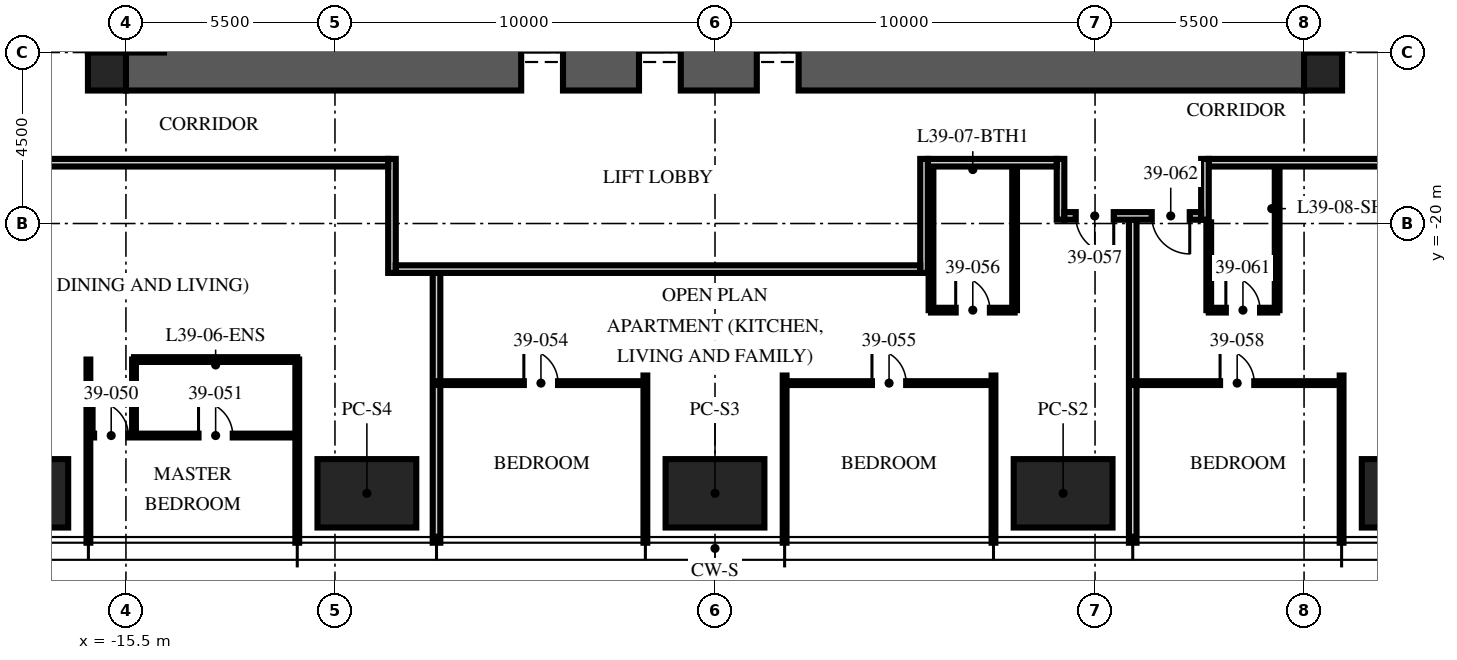
"""IFC4 building model, lengths in metres.
Left out: names, types, materials, properties, quantities, classifications, styles, units other than length and angle.
Written with IfcOpenShell. Run it as: python <this file> out.ifc"""

import sys

from ifc_helpers import new_model, si_unit, direction, frame, frame_2d, origin, origin_2d, place, context, subcontext, project, spatial, rectangle, extrude, element, fill, save


model = new_model("IFC4")
c1 = context("Model", 3, precision=1e-05, world=origin(), true_north=direction((0.0, 1.0)))
c2 = subcontext(c1, "Body", "Model", "MODEL_VIEW")
j1 = project(units=[si_unit("LENGTHUNIT", "METRE"), si_unit("PLANEANGLEUNIT", "RADIAN")], contexts=[c1])
p1 = place(None, origin())
s1 = spatial("IfcSite", under=j1, at=p1, CompositionType="ELEMENT")
p2 = place(p1, origin())
s2 = spatial("IfcBuilding", under=s1, at=p2, CompositionType="ELEMENT")
p3 = place(p2, frame((0.0, 0.0, 156.0)))
s3 = spatial("IfcBuildingStorey", under=s2, at=p3, CompositionType="ELEMENT", Elevation=156.0)
p4 = place(p3, frame((-15.5, -15.5, -0.25), z_axis=(0.0, 0.0, 1.0), x_axis=(1.0, 0.0, 0.0)))
e1 = element("IfcWall", 1, at=p4, inside=s3, PredefinedType="SHEAR", context=c2, shape_type="SweptSolid", body=[
    extrude(rectangle(XDim=31.0, YDim=2.0, at=frame_2d((15.5, 0.0))), origin(), (0.0, 0.0, 1.0), 3.75),
])
p5 = place(p4, frame((10.4, 0.0, 0.25)))
e2 = element("IfcOpeningElement", 2, at=p5, cuts=e1, PredefinedType="OPENING", context=c2, shape_type="SweptSolid", body=[
    extrude(rectangle(XDim=1.1, YDim=2.1, at=frame_2d((0.55, 1.05))), frame((0.0, 1.01, 0.0), z_axis=(0.0, -1.0, 0.0), x_axis=(1.0, 0.0, 0.0)), (0.0, 0.0, 1.0), 2.02),
])
p6 = place(p4, frame((13.5, 0.0, 0.25)))
e3 = element("IfcOpeningElement", 3, at=p6, cuts=e1, PredefinedType="OPENING", context=c2, shape_type="SweptSolid", body=[
    extrude(rectangle(XDim=1.1, YDim=2.1, at=frame_2d((0.55, 1.05))), frame((0.0, 1.01, 0.0), z_axis=(0.0, -1.0, 0.0), x_axis=(1.0, 0.0, 0.0)), (0.0, 0.0, 1.0), 2.02),
])
p7 = place(p4, frame((16.6, 0.0, 0.25)))
e4 = element("IfcOpeningElement", 4, at=p7, cuts=e1, PredefinedType="OPENING", context=c2, shape_type="SweptSolid", body=[
    extrude(rectangle(XDim=1.1, YDim=2.1, at=frame_2d((0.55, 1.05))), frame((0.0, 1.01, 0.0), z_axis=(0.0, -1.0, 0.0), x_axis=(1.0, 0.0, 0.0)), (0.0, 0.0, 1.0), 2.02),
])
for number, where, z_axis, x_axis in (
    (5, (-16.0, -16.0, -0.25), (0.0, 0.0, 1.0), (1.0, 0.0, 0.0)),
    (6, (16.0, -16.0, -0.25), (0.0, 0.0, 1.0), (1.0, 0.0, 0.0)),
):
    element("IfcColumn", number, at=place(p3, frame(where, z_axis=z_axis, x_axis=x_axis)), inside=s3, PredefinedType="COLUMN", context=c2, shape_type="SweptSolid", body=[
        extrude(rectangle(XDim=1.0, YDim=1.0, at=origin_2d()), origin(), (0.0, 0.0, 1.0), 3.75),
    ])
for number, where, z_axis, x_axis in (
    (7, (18.32, -27.1, 0.0), (0.0, 0.0, 1.0), (1.0, 0.0, 0.0)),
    (8, (9.16, -27.1, 0.0), (0.0, 0.0, 1.0), (1.0, 0.0, 0.0)),
    (9, (0.0, -27.1, 0.0), (0.0, 0.0, 1.0), (1.0, 0.0, 0.0)),
    (10, (-9.16, -27.1, 0.0), (0.0, 0.0, 1.0), (1.0, 0.0, 0.0)),
    (11, (-18.32, -27.1, 0.0), (0.0, 0.0, 1.0), (1.0, 0.0, 0.0)),
):
    element("IfcColumn", number, at=place(p3, frame(where, z_axis=z_axis, x_axis=x_axis)), inside=s3, PredefinedType="COLUMN", context=c2, shape_type="SweptSolid", body=[
        extrude(rectangle(XDim=2.6, YDim=1.8, at=origin_2d()), origin(), (0.0, 0.0, 1.0), 3.75),
    ])
for number, where, z_axis, x_axis in (
    (12, (-16.488, -23.58, 0.0), (0.0, 0.0, 1.0), (0.0, -1.0, 0.0)),
    (13, (-10.992, -23.58, 0.0), (0.0, 0.0, 1.0), (0.0, -1.0, 0.0)),
):
    element("IfcWall", number, at=place(p3, frame(where, z_axis=z_axis, x_axis=x_axis)), inside=s3, PredefinedType="PARTITIONING", context=c2, shape_type="SweptSolid", body=[
        extrude(rectangle(XDim=4.82, YDim=0.1, at=frame_2d((2.41, 0.0))), origin(), (0.0, 0.0, 1.0), 2.81),
    ])
p8 = place(p3, frame((-7.328, -21.3, 0.0), z_axis=(0.0, 0.0, 1.0), x_axis=(0.0, -1.0, 0.0)))
e14 = element("IfcWall", 14, at=p8, inside=s3, PredefinedType="PARTITIONING", context=c2, shape_type="SweptSolid", body=[
    extrude(rectangle(XDim=7.1, YDim=0.2, at=frame_2d((3.55, 0.0))), origin(), (0.0, 0.0, 1.0), 2.81),
])
for number, where, z_axis, x_axis in (
    (15, (-1.832, -24.0, 0.0), (0.0, 0.0, 1.0), (0.0, -1.0, 0.0)),
    (16, (1.832, -24.0, 0.0), (0.0, 0.0, 1.0), (0.0, -1.0, 0.0)),
    (17, (7.328, -24.0, 0.0), (0.0, 0.0, 1.0), (0.0, -1.0, 0.0)),
):
    element("IfcWall", number, at=place(p3, frame(where, z_axis=z_axis, x_axis=x_axis)), inside=s3, PredefinedType="PARTITIONING", context=c2, shape_type="SweptSolid", body=[
        extrude(rectangle(XDim=4.4, YDim=0.1, at=frame_2d((2.2, 0.0))), origin(), (0.0, 0.0, 1.0), 2.81),
    ])
p9 = place(p3, frame((10.992, -19.9, 0.0), z_axis=(0.0, 0.0, 1.0), x_axis=(0.0, -1.0, 0.0)))
e18 = element("IfcWall", 18, at=p9, inside=s3, PredefinedType="PARTITIONING", context=c2, shape_type="SweptSolid", body=[
    extrude(rectangle(XDim=8.5, YDim=0.2, at=frame_2d((4.25, 0.0))), origin(), (0.0, 0.0, 1.0), 2.81),
])
p10 = place(p3, frame((16.488, -24.0, 0.0), z_axis=(0.0, 0.0, 1.0), x_axis=(0.0, -1.0, 0.0)))
e19 = element("IfcWall", 19, at=p10, inside=s3, PredefinedType="PARTITIONING", context=c2, shape_type="SweptSolid", body=[
    extrude(rectangle(XDim=4.4, YDim=0.1, at=frame_2d((2.2, 0.0))), origin(), (0.0, 0.0, 1.0), 2.81),
])
p11 = place(p3, frame((-16.488, -25.58, 0.0), z_axis=(0.0, 0.0, 1.0), x_axis=(1.0, 0.0, 0.0)))
e20 = element("IfcWall", 20, at=p11, inside=s3, PredefinedType="PARTITIONING", context=c2, shape_type="SweptSolid", body=[
    extrude(rectangle(XDim=5.496, YDim=0.1, at=frame_2d((2.748, 0.0))), origin(), (0.0, 0.0, 1.0), 2.81),
])
p12 = place(p11, frame((0.15, 0.0, 0.0)))
e21 = element("IfcOpeningElement", 21, at=p12, cuts=e20, PredefinedType="OPENING", context=c2, shape_type="SweptSolid", body=[
    extrude(rectangle(XDim=0.9, YDim=2.1, at=frame_2d((0.45, 1.05))), frame((0.0, 0.06, 0.0), z_axis=(0.0, -1.0, 0.0), x_axis=(1.0, 0.0, 0.0)), (0.0, 0.0, 1.0), 0.12),
])
p13 = place(p11, frame((2.898, 0.0, 0.0)))
e22 = element("IfcOpeningElement", 22, at=p13, cuts=e20, PredefinedType="OPENING", context=c2, shape_type="SweptSolid", body=[
    extrude(rectangle(XDim=0.9, YDim=2.1, at=frame_2d((0.45, 1.05))), frame((0.0, 0.06, 0.0), z_axis=(0.0, -1.0, 0.0), x_axis=(1.0, 0.0, 0.0)), (0.0, 0.0, 1.0), 0.12),
])
p14 = place(p3, frame((-15.288, -23.58, 0.0), z_axis=(0.0, 0.0, 1.0), x_axis=(0.0, -1.0, 0.0)))
e23 = element("IfcWall", 23, at=p14, inside=s3, PredefinedType="PARTITIONING", context=c2, shape_type="SweptSolid", body=[
    extrude(rectangle(XDim=2.0, YDim=0.1, at=frame_2d((1.0, 0.0))), origin(), (0.0, 0.0, 1.0), 3.5),
])
p15 = place(p3, frame((-15.288, -23.58, 0.0), z_axis=(0.0, 0.0, 1.0), x_axis=(1.0, 0.0, 0.0)))
e24 = element("IfcWall", 24, at=p15, inside=s3, PredefinedType="PARTITIONING", context=c2, shape_type="SweptSolid", body=[
    extrude(rectangle(XDim=4.296, YDim=0.125, at=frame_2d((2.148, 0.0))), origin(), (0.0, 0.0, 1.0), 2.81),
])
p16 = place(p3, frame((-7.328, -24.2, 0.0), z_axis=(0.0, 0.0, 1.0), x_axis=(1.0, 0.0, 0.0)))
e25 = element("IfcWall", 25, at=p16, inside=s3, PredefinedType="PARTITIONING", context=c2, shape_type="SweptSolid", body=[
    extrude(rectangle(XDim=5.496, YDim=0.1, at=frame_2d((2.748, 0.0))), origin(), (0.0, 0.0, 1.0), 2.81),
])
p17 = place(p16, frame((2.298, 0.0, 0.0)))
e26 = element("IfcOpeningElement", 26, at=p17, cuts=e25, PredefinedType="OPENING", context=c2, shape_type="SweptSolid", body=[
    extrude(rectangle(XDim=0.9, YDim=2.1, at=frame_2d((0.45, 1.05))), frame((0.0, 0.06, 0.0), z_axis=(0.0, -1.0, 0.0), x_axis=(1.0, 0.0, 0.0)), (0.0, 0.0, 1.0), 0.12),
])
p18 = place(p3, frame((1.832, -24.2, 0.0), z_axis=(0.0, 0.0, 1.0), x_axis=(1.0, 0.0, 0.0)))
e27 = element("IfcWall", 27, at=p18, inside=s3, PredefinedType="PARTITIONING", context=c2, shape_type="SweptSolid", body=[
    extrude(rectangle(XDim=5.496, YDim=0.1, at=frame_2d((2.748, 0.0))), origin(), (0.0, 0.0, 1.0), 2.81),
])
p19 = place(p18, frame((2.298, 0.0, 0.0)))
e28 = element("IfcOpeningElement", 28, at=p19, cuts=e27, PredefinedType="OPENING", context=c2, shape_type="SweptSolid", body=[
    extrude(rectangle(XDim=0.9, YDim=2.1, at=frame_2d((0.45, 1.05))), frame((0.0, 0.06, 0.0), z_axis=(0.0, -1.0, 0.0), x_axis=(1.0, 0.0, 0.0)), (0.0, 0.0, 1.0), 0.12),
])
p20 = place(p3, frame((5.684, -22.28, 0.0), z_axis=(0.0, 0.0, 1.0), x_axis=(1.0, 0.0, 0.0)))
e29 = element("IfcWall", 29, at=p20, inside=s3, PredefinedType="PARTITIONING", context=c2, shape_type="SweptSolid", body=[
    extrude(rectangle(XDim=2.2, YDim=0.125, at=frame_2d((1.1, 0.0))), origin(), (0.0, 0.0, 1.0), 3.5),
])
p21 = place(p20, frame((0.65, 0.0, 0.0)))
e30 = element("IfcOpeningElement", 30, at=p21, cuts=e29, PredefinedType="OPENING", context=c2, shape_type="SweptSolid", body=[
    extrude(rectangle(XDim=0.9, YDim=2.1, at=frame_2d((0.45, 1.05))), frame((0.0, 0.073, 0.0), z_axis=(0.0, -1.0, 0.0), x_axis=(1.0, 0.0, 0.0)), (0.0, 0.0, 1.0), 0.145),
])
for number, where, z_axis, x_axis in (
    (31, (5.684, -18.5, 0.0), (0.0, 0.0, 1.0), (0.0, -1.0, 0.0)),
    (32, (7.884, -18.5, 0.0), (0.0, 0.0, 1.0), (0.0, -1.0, 0.0)),
):
    element("IfcWall", number, at=place(p3, frame(where, z_axis=z_axis, x_axis=x_axis)), inside=s3, PredefinedType="PARTITIONING", context=c2, shape_type="SweptSolid", body=[
        extrude(rectangle(XDim=3.78, YDim=0.125, at=frame_2d((1.89, 0.0))), origin(), (0.0, 0.0, 1.0), 3.5),
    ])
p22 = place(p3, frame((10.992, -24.2, 0.0), z_axis=(0.0, 0.0, 1.0), x_axis=(1.0, 0.0, 0.0)))
e33 = element("IfcWall", 33, at=p22, inside=s3, PredefinedType="PARTITIONING", context=c2, shape_type="SweptSolid", body=[
    extrude(rectangle(XDim=5.496, YDim=0.1, at=frame_2d((2.748, 0.0))), origin(), (0.0, 0.0, 1.0), 2.81),
])
p23 = place(p22, frame((2.298, 0.0, 0.0)))
e34 = element("IfcOpeningElement", 34, at=p23, cuts=e33, PredefinedType="OPENING", context=c2, shape_type="SweptSolid", body=[
    extrude(rectangle(XDim=0.9, YDim=2.1, at=frame_2d((0.45, 1.05))), frame((0.0, 0.06, 0.0), z_axis=(0.0, -1.0, 0.0), x_axis=(1.0, 0.0, 0.0)), (0.0, 0.0, 1.0), 0.12),
])
p24 = place(p3, frame((12.992, -22.28, 0.0), z_axis=(0.0, 0.0, 1.0), x_axis=(1.0, 0.0, 0.0)))
e35 = element("IfcWall", 35, at=p24, inside=s3, PredefinedType="PARTITIONING", context=c2, shape_type="SweptSolid", body=[
    extrude(rectangle(XDim=1.8, YDim=0.125, at=frame_2d((0.9, 0.0))), origin(), (0.0, 0.0, 1.0), 2.81),
])
p25 = place(p24, frame((0.45, 0.0, 0.0)))
e36 = element("IfcOpeningElement", 36, at=p25, cuts=e35, PredefinedType="OPENING", context=c2, shape_type="SweptSolid", body=[
    extrude(rectangle(XDim=0.9, YDim=2.1, at=frame_2d((0.45, 1.05))), frame((0.0, 0.073, 0.0), z_axis=(0.0, -1.0, 0.0), x_axis=(1.0, 0.0, 0.0)), (0.0, 0.0, 1.0), 0.145),
])
p26 = place(p3, frame((12.992, -19.97, 0.0), z_axis=(0.0, 0.0, 1.0), x_axis=(0.0, -1.0, 0.0)))
e37 = element("IfcWall", 37, at=p26, inside=s3, PredefinedType="PARTITIONING", context=c2, shape_type="SweptSolid", body=[
    extrude(rectangle(XDim=2.31, YDim=0.125, at=frame_2d((1.155, 0.0))), origin(), (0.0, 0.0, 1.0), 3.5),
])
p27 = place(p3, frame((14.792, -18.5, 0.0), z_axis=(0.0, 0.0, 1.0), x_axis=(0.0, -1.0, 0.0)))
e38 = element("IfcWall", 38, at=p27, inside=s3, PredefinedType="PARTITIONING", context=c2, shape_type="SweptSolid", body=[
    extrude(rectangle(XDim=3.78, YDim=0.125, at=frame_2d((1.89, 0.0))), origin(), (0.0, 0.0, 1.0), 3.5),
])
p28 = place(p3, frame((18.5, -18.4, 0.0), z_axis=(0.0, 0.0, 1.0), x_axis=(-1.0, 0.0, 0.0)))
e39 = element("IfcWall", 39, at=p28, inside=s3, PredefinedType="PARTITIONING", context=c2, shape_type="SweptSolid", body=[
    extrude(rectangle(XDim=5.508, YDim=0.2, at=frame_2d((2.754, 0.0))), origin(), (0.0, 0.0, 1.0), 2.3),
])
p29 = place(p3, frame((12.892, -18.3, 0.0), z_axis=(0.0, 0.0, 1.0), x_axis=(0.0, -1.0, 0.0)))
e40 = element("IfcWall", 40, at=p29, inside=s3, PredefinedType="PARTITIONING", context=c2, shape_type="SweptSolid", body=[
    extrude(rectangle(XDim=1.6, YDim=0.2, at=frame_2d((0.8, 0.0))), origin(), (0.0, 0.0, 1.0), 3.5),
])
p30 = place(p3, frame((9.092, -18.3, 0.0), z_axis=(0.0, 0.0, 1.0), x_axis=(0.0, -1.0, 0.0)))
e41 = element("IfcWall", 41, at=p30, inside=s3, PredefinedType="PARTITIONING", context=c2, shape_type="SweptSolid", body=[
    extrude(rectangle(XDim=1.6, YDim=0.2, at=frame_2d((0.8, 0.0))), origin(), (0.0, 0.0, 1.0), 2.7),
])
p31 = place(p3, frame((12.792, -19.8, 0.0), z_axis=(0.0, 0.0, 1.0), x_axis=(-1.0, 0.0, 0.0)))
e42 = element("IfcWall", 42, at=p31, inside=s3, PredefinedType="PARTITIONING", context=c2, shape_type="SweptSolid", body=[
    extrude(rectangle(XDim=3.6, YDim=0.2, at=frame_2d((1.8, 0.0))), origin(), (0.0, 0.0, 1.0), 2.7),
])
p32 = place(p31, frame((2.3, 0.0, 0.0)))
e43 = element("IfcOpeningElement", 43, at=p32, cuts=e42, PredefinedType="OPENING", context=c2, shape_type="SweptSolid", body=[
    extrude(rectangle(XDim=1.0, YDim=2.2, at=frame_2d((0.5, 1.1))), frame((0.0, 0.11, 0.0), z_axis=(0.0, -1.0, 0.0), x_axis=(1.0, 0.0, 0.0)), (0.0, 0.0, 1.0), 0.22),
])
p33 = place(p31, frame((0.3, 0.0, 0.0)))
e44 = element("IfcOpeningElement", 44, at=p33, cuts=e42, PredefinedType="OPENING", context=c2, shape_type="SweptSolid", body=[
    extrude(rectangle(XDim=1.0, YDim=2.2, at=frame_2d((0.5, 1.1))), frame((0.0, 0.11, 0.0), z_axis=(0.0, -1.0, 0.0), x_axis=(1.0, 0.0, 0.0)), (0.0, 0.0, 1.0), 0.22),
])
p34 = place(p3, frame((8.992, -18.4, 0.0), z_axis=(0.0, 0.0, 1.0), x_axis=(-1.0, 0.0, 0.0)))
e45 = element("IfcWall", 45, at=p34, inside=s3, PredefinedType="PARTITIONING", context=c2, shape_type="SweptSolid", body=[
    extrude(rectangle(XDim=3.392, YDim=0.2, at=frame_2d((1.696, 0.0))), origin(), (0.0, 0.0, 1.0), 3.5),
])
for number, where, z_axis, x_axis in (
    (46, (5.5, -18.3, 0.0), (0.0, 0.0, 1.0), (0.0, -1.0, 0.0)),
    (47, (-8.5, -18.3, 0.0), (0.0, 0.0, 1.0), (0.0, -1.0, 0.0)),
):
    element("IfcWall", number, at=place(p3, frame(where, z_axis=z_axis, x_axis=x_axis)), inside=s3, PredefinedType="PARTITIONING", context=c2, shape_type="SweptSolid", body=[
        extrude(rectangle(XDim=3.0, YDim=0.2, at=frame_2d((1.5, 0.0))), origin(), (0.0, 0.0, 1.0), 3.5),
    ])
p35 = place(p3, frame((5.4, -21.2, 0.0), z_axis=(0.0, 0.0, 1.0), x_axis=(-1.0, 0.0, 0.0)))
e48 = element("IfcWall", 48, at=p35, inside=s3, PredefinedType="PARTITIONING", context=c2, shape_type="SweptSolid", body=[
    extrude(rectangle(XDim=13.8, YDim=0.2, at=frame_2d((6.9, 0.0))), origin(), (0.0, 0.0, 1.0), 2.7),
])
p36 = place(p3, frame((-8.6, -18.4, 0.0), z_axis=(0.0, 0.0, 1.0), x_axis=(-1.0, 0.0, 0.0)))
e49 = element("IfcWall", 49, at=p36, inside=s3, PredefinedType="PARTITIONING", context=c2, shape_type="SweptSolid", body=[
    extrude(rectangle(XDim=9.9, YDim=0.2, at=frame_2d((4.95, 0.0))), origin(), (0.0, 0.0, 1.0), 2.3),
])
p37 = place(p5, origin())
e50 = element("IfcDoor", 50, at=p37, inside=s3, OperationType="DOUBLE_DOOR_SLIDING", PredefinedType="DOOR", context=c2, shape_type="SweptSolid", body=[
    extrude(rectangle(XDim=1.1, YDim=2.1, at=frame_2d((0.55, 1.05))), frame((0.0, 0.025, 0.0), z_axis=(0.0, -1.0, 0.0), x_axis=(1.0, 0.0, 0.0)), (0.0, 0.0, 1.0), 0.05),
])
fill(e2, e50)
p38 = place(p6, origin())
e51 = element("IfcDoor", 51, at=p38, inside=s3, OperationType="DOUBLE_DOOR_SLIDING", PredefinedType="DOOR", context=c2, shape_type="SweptSolid", body=[
    extrude(rectangle(XDim=1.1, YDim=2.1, at=frame_2d((0.55, 1.05))), frame((0.0, 0.025, 0.0), z_axis=(0.0, -1.0, 0.0), x_axis=(1.0, 0.0, 0.0)), (0.0, 0.0, 1.0), 0.05),
])
fill(e3, e51)
p39 = place(p7, origin())
e52 = element("IfcDoor", 52, at=p39, inside=s3, OperationType="DOUBLE_DOOR_SLIDING", PredefinedType="DOOR", context=c2, shape_type="SweptSolid", body=[
    extrude(rectangle(XDim=1.1, YDim=2.1, at=frame_2d((0.55, 1.05))), frame((0.0, 0.025, 0.0), z_axis=(0.0, -1.0, 0.0), x_axis=(1.0, 0.0, 0.0)), (0.0, 0.0, 1.0), 0.05),
])
fill(e4, e52)
p40 = place(p12, origin())
e53 = element("IfcDoor", 53, at=p40, inside=s3, OperationType="SINGLE_SWING_LEFT", PredefinedType="DOOR", context=c2, shape_type="SweptSolid", body=[
    extrude(rectangle(XDim=0.9, YDim=2.1, at=frame_2d((0.45, 1.05))), frame((0.0, 0.025, 0.0), z_axis=(0.0, -1.0, 0.0), x_axis=(1.0, 0.0, 0.0)), (0.0, 0.0, 1.0), 0.05),
])
fill(e21, e53)
p41 = place(p13, origin())
e54 = element("IfcDoor", 54, at=p41, inside=s3, OperationType="SINGLE_SWING_LEFT", PredefinedType="DOOR", context=c2, shape_type="SweptSolid", body=[
    extrude(rectangle(XDim=0.9, YDim=2.1, at=frame_2d((0.45, 1.05))), frame((0.0, 0.025, 0.0), z_axis=(0.0, -1.0, 0.0), x_axis=(1.0, 0.0, 0.0)), (0.0, 0.0, 1.0), 0.05),
])
fill(e22, e54)
p42 = place(p17, origin())
e55 = element("IfcDoor", 55, at=p42, inside=s3, OperationType="SINGLE_SWING_LEFT", PredefinedType="DOOR", context=c2, shape_type="SweptSolid", body=[
    extrude(rectangle(XDim=0.9, YDim=2.1, at=frame_2d((0.45, 1.05))), frame((0.0, 0.025, 0.0), z_axis=(0.0, -1.0, 0.0), x_axis=(1.0, 0.0, 0.0)), (0.0, 0.0, 1.0), 0.05),
])
fill(e26, e55)
p43 = place(p19, origin())
e56 = element("IfcDoor", 56, at=p43, inside=s3, OperationType="SINGLE_SWING_LEFT", PredefinedType="DOOR", context=c2, shape_type="SweptSolid", body=[
    extrude(rectangle(XDim=0.9, YDim=2.1, at=frame_2d((0.45, 1.05))), frame((0.0, 0.025, 0.0), z_axis=(0.0, -1.0, 0.0), x_axis=(1.0, 0.0, 0.0)), (0.0, 0.0, 1.0), 0.05),
])
fill(e28, e56)
p44 = place(p21, origin())
e57 = element("IfcDoor", 57, at=p44, inside=s3, OperationType="SINGLE_SWING_LEFT", PredefinedType="DOOR", context=c2, shape_type="SweptSolid", body=[
    extrude(rectangle(XDim=0.9, YDim=2.1, at=frame_2d((0.45, 1.05))), frame((0.0, 0.025, 0.0), z_axis=(0.0, -1.0, 0.0), x_axis=(1.0, 0.0, 0.0)), (0.0, 0.0, 1.0), 0.05),
])
fill(e30, e57)
p45 = place(p32, origin())
e58 = element("IfcDoor", 58, at=p45, inside=s3, OperationType="SINGLE_SWING_LEFT", PredefinedType="DOOR", context=c2, shape_type="SweptSolid", body=[
    extrude(rectangle(XDim=1.0, YDim=2.2, at=frame_2d((0.5, 1.1))), frame((0.0, 0.025, 0.0), z_axis=(0.0, -1.0, 0.0), x_axis=(1.0, 0.0, 0.0)), (0.0, 0.0, 1.0), 0.05),
])
fill(e43, e58)
p46 = place(p23, origin())
e59 = element("IfcDoor", 59, at=p46, inside=s3, OperationType="SINGLE_SWING_LEFT", PredefinedType="DOOR", context=c2, shape_type="SweptSolid", body=[
    extrude(rectangle(XDim=0.9, YDim=2.1, at=frame_2d((0.45, 1.05))), frame((0.0, 0.025, 0.0), z_axis=(0.0, -1.0, 0.0), x_axis=(1.0, 0.0, 0.0)), (0.0, 0.0, 1.0), 0.05),
])
fill(e34, e59)
p47 = place(p25, origin())
e60 = element("IfcDoor", 60, at=p47, inside=s3, OperationType="SINGLE_SWING_LEFT", PredefinedType="DOOR", context=c2, shape_type="SweptSolid", body=[
    extrude(rectangle(XDim=0.9, YDim=2.1, at=frame_2d((0.45, 1.05))), frame((0.0, 0.025, 0.0), z_axis=(0.0, -1.0, 0.0), x_axis=(1.0, 0.0, 0.0)), (0.0, 0.0, 1.0), 0.05),
])
fill(e36, e60)
p48 = place(p33, origin())
e61 = element("IfcDoor", 61, at=p48, inside=s3, OperationType="SINGLE_SWING_LEFT", PredefinedType="DOOR", context=c2, shape_type="SweptSolid", body=[
    extrude(rectangle(XDim=1.0, YDim=2.2, at=frame_2d((0.5, 1.1))), frame((0.0, 0.025, 0.0), z_axis=(0.0, -1.0, 0.0), x_axis=(1.0, 0.0, 0.0)), (0.0, 0.0, 1.0), 0.05),
])
fill(e44, e61)
save(model, sys.argv[1])
